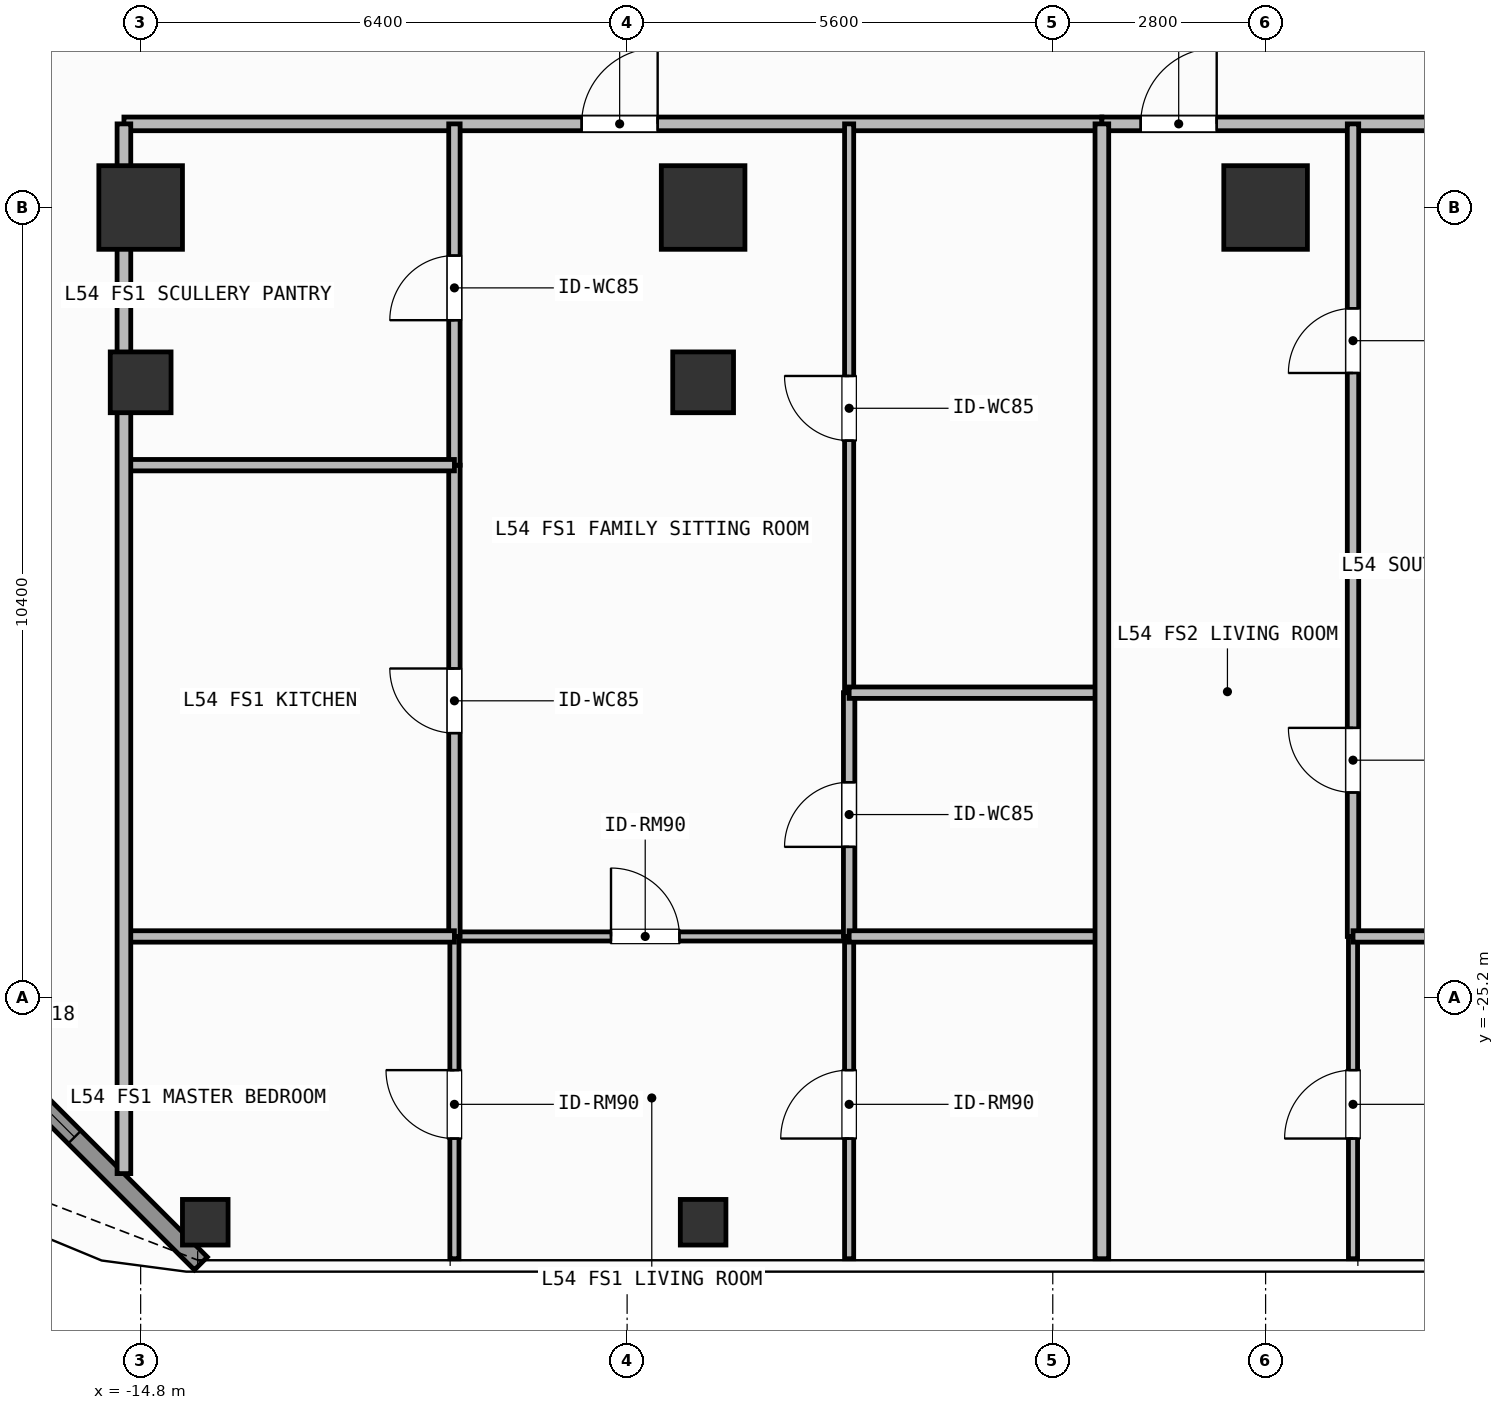
"""IFC4 building model, lengths in metres.
Left out: names, types, materials, properties, quantities, classifications, styles, units other than length and angle.
Written with IfcOpenShell. Run it as: python <this file> out.ifc"""

import sys

from ifc_helpers import new_model, si_unit, direction, frame, frame_2d, origin, origin_2d, place, context, subcontext, project, spatial, rectangle, hollow_rectangle, extrude, element, fill, save


model = new_model("IFC4")
c1 = context("Model", 3, precision=1e-05, world=origin(), true_north=direction((0.0, 1.0)))
c2 = subcontext(c1, "Body", "Model", "MODEL_VIEW")
j1 = project(units=[si_unit("LENGTHUNIT", "METRE"), si_unit("PLANEANGLEUNIT", "RADIAN")], contexts=[c1])
p1 = place(None, origin())
s1 = spatial("IfcSite", under=j1, at=p1, CompositionType="ELEMENT")
p2 = place(p1, origin())
s2 = spatial("IfcBuilding", under=s1, at=p2, CompositionType="ELEMENT")
p3 = place(p2, frame((0.0, 0.0, 219.6)))
s3 = spatial("IfcBuildingStorey", under=s2, at=p3, CompositionType="ELEMENT", Elevation=219.6)
for number, where, z_axis, x_axis in (
    (1, (-14.8, -14.8, 0.0), (0.0, 0.0, 1.0), (1.0, 0.0, 0.0)),
    (2, (-7.4, -14.8, 0.0), (0.0, 0.0, 1.0), (1.0, 0.0, 0.0)),
    (3, (0.0, -14.8, 0.0), (0.0, 0.0, 1.0), (1.0, 0.0, 0.0)),
):
    element("IfcColumn", number, at=place(p3, frame(where, z_axis=z_axis, x_axis=x_axis)), inside=s3, PredefinedType="COLUMN", context=c2, shape_type="SweptSolid", body=[
        extrude(rectangle(XDim=1.1, YDim=1.1, at=origin_2d()), origin(), (0.0, 0.0, 1.0), 3.9),
    ])
for number, where, z_axis, x_axis in (
    (4, (-14.8, -17.1, 0.0), (0.0, 0.0, 1.0), (1.0, 0.0, 0.0)),
    (5, (-7.4, -17.1, 0.0), (0.0, 0.0, 1.0), (1.0, 0.0, 0.0)),
):
    element("IfcColumn", number, at=place(p3, frame(where, z_axis=z_axis, x_axis=x_axis)), inside=s3, PredefinedType="COLUMN", context=c2, shape_type="SweptSolid", body=[
        extrude(hollow_rectangle(XDim=0.8, YDim=0.8, WallThickness=0.036, at=origin_2d()), origin(), (0.0, 0.0, 1.0), 3.9),
    ])
for number, where, z_axis, x_axis in (
    (6, (-13.95, -28.15, 0.0), (0.0, 0.0, 1.0), (1.0, 0.0, 0.0)),
    (7, (-7.4, -28.15, 0.0), (0.0, 0.0, 1.0), (1.0, 0.0, 0.0)),
):
    element("IfcColumn", number, at=place(p3, frame(where, z_axis=z_axis, x_axis=x_axis)), inside=s3, PredefinedType="COLUMN", context=c2, shape_type="SweptSolid", body=[
        extrude(hollow_rectangle(XDim=0.6, YDim=0.6, WallThickness=0.028, at=origin_2d()), origin(), (0.0, 0.0, 1.0), 3.9),
    ])
p4 = place(p3, frame((-14.008, -28.692, 0.0), z_axis=(0.0, 0.0, 1.0), x_axis=(-0.707106781187, 0.707106781187, 0.0)))
e8 = element("IfcWall", 8, at=p4, inside=s3, PredefinedType="SOLIDWALL", context=c2, shape_type="SweptSolid", body=[
    extrude(rectangle(XDim=6.201, YDim=0.24, at=frame_2d((3.101, 0.0))), origin(), (0.0, 0.0, 1.0), 3.68),
])
p5 = place(p4, frame((2.351, 0.0, 0.8)))
e9 = element("IfcOpeningElement", 9, at=p5, cuts=e8, PredefinedType="OPENING", context=c2, shape_type="SweptSolid", body=[
    extrude(rectangle(XDim=1.5, YDim=1.85, at=frame_2d((0.75, 0.925))), frame((0.0, 0.13, 0.0), z_axis=(0.0, -1.0, 0.0), x_axis=(1.0, 0.0, 0.0)), (0.0, 0.0, 1.0), 0.26),
])
p6 = place(p3, frame((-15.02, -13.7, 0.0), z_axis=(0.0, 0.0, 1.0), x_axis=(1.0, 0.0, 0.0)))
e10 = element("IfcWall", 10, at=p6, inside=s3, PredefinedType="PARTITIONING", context=c2, shape_type="SweptSolid", body=[
    extrude(rectangle(XDim=12.866, YDim=0.18, at=frame_2d((6.433, 0.0))), origin(), (0.0, 0.0, 1.0), 3.68),
])
p7 = place(p6, frame((6.022, 0.0, 0.0)))
e11 = element("IfcOpeningElement", 11, at=p7, cuts=e10, PredefinedType="OPENING", context=c2, shape_type="SweptSolid", body=[
    extrude(rectangle(XDim=1.0, YDim=2.2, at=frame_2d((0.5, 1.1))), frame((0.0, 0.1, 0.0), z_axis=(0.0, -1.0, 0.0), x_axis=(1.0, 0.0, 0.0)), (0.0, 0.0, 1.0), 0.2),
])
p8 = place(p3, frame((-10.672, -24.39, 0.0), z_axis=(0.0, 0.0, 1.0), x_axis=(1.0, 0.0, 0.0)))
e12 = element("IfcWall", 12, at=p8, inside=s3, PredefinedType="PARTITIONING", context=c2, shape_type="SweptSolid", body=[
    extrude(rectangle(XDim=5.193, YDim=0.12, at=frame_2d((2.597, 0.0))), origin(), (0.0, 0.0, 1.0), 3.68),
])
p9 = place(p8, frame((2.06, 0.0, 0.0)))
e13 = element("IfcOpeningElement", 13, at=p9, cuts=e12, PredefinedType="OPENING", context=c2, shape_type="SweptSolid", body=[
    extrude(rectangle(XDim=0.9, YDim=2.1, at=frame_2d((0.45, 1.05))), frame((0.0, 0.07, 0.0), z_axis=(0.0, -1.0, 0.0), x_axis=(1.0, 0.0, 0.0)), (0.0, 0.0, 1.0), 0.14),
])
p10 = place(p3, frame((-10.672, -24.39, 0.0), z_axis=(0.0, 0.0, 1.0), x_axis=(0.0, 1.0, 0.0)))
e14 = element("IfcWall", 14, at=p10, inside=s3, PredefinedType="PARTITIONING", context=c2, shape_type="SweptSolid", body=[
    extrude(rectangle(XDim=6.2, YDim=0.15, at=frame_2d((3.1, 0.0))), origin(), (0.0, 0.0, 1.0), 3.68),
])
p11 = place(p10, frame((2.675, 0.0, 0.0)))
e15 = element("IfcOpeningElement", 15, at=p11, cuts=e14, PredefinedType="OPENING", context=c2, shape_type="SweptSolid", body=[
    extrude(rectangle(XDim=0.85, YDim=2.1, at=frame_2d((0.425, 1.05))), frame((0.0, 0.085, 0.0), z_axis=(0.0, -1.0, 0.0), x_axis=(1.0, 0.0, 0.0)), (0.0, 0.0, 1.0), 0.17),
])
p12 = place(p3, frame((-10.672, -18.19, 0.0), z_axis=(0.0, 0.0, 1.0), x_axis=(0.0, 1.0, 0.0)))
e16 = element("IfcWall", 16, at=p12, inside=s3, PredefinedType="PARTITIONING", context=c2, shape_type="SweptSolid", body=[
    extrude(rectangle(XDim=4.49, YDim=0.15, at=frame_2d((2.245, 0.0))), origin(), (0.0, 0.0, 1.0), 3.68),
])
p13 = place(p12, frame((1.907, 0.0, 0.0)))
e17 = element("IfcOpeningElement", 17, at=p13, cuts=e16, PredefinedType="OPENING", context=c2, shape_type="SweptSolid", body=[
    extrude(rectangle(XDim=0.85, YDim=2.1, at=frame_2d((0.425, 1.05))), frame((0.0, 0.085, 0.0), z_axis=(0.0, -1.0, 0.0), x_axis=(1.0, 0.0, 0.0)), (0.0, 0.0, 1.0), 0.17),
])
p14 = place(p3, frame((-10.672, -28.63, 0.0), z_axis=(0.0, 0.0, 1.0), x_axis=(0.0, 1.0, 0.0)))
e18 = element("IfcWall", 18, at=p14, inside=s3, PredefinedType="PARTITIONING", context=c2, shape_type="SweptSolid", body=[
    extrude(rectangle(XDim=4.24, YDim=0.12, at=frame_2d((2.12, 0.0))), origin(), (0.0, 0.0, 1.0), 3.68),
])
p15 = place(p14, frame((1.581, 0.0, 0.0)))
e19 = element("IfcOpeningElement", 19, at=p15, cuts=e18, PredefinedType="OPENING", context=c2, shape_type="SweptSolid", body=[
    extrude(rectangle(XDim=0.9, YDim=2.1, at=frame_2d((0.45, 1.05))), frame((0.0, 0.07, 0.0), z_axis=(0.0, -1.0, 0.0), x_axis=(1.0, 0.0, 0.0)), (0.0, 0.0, 1.0), 0.14),
])
p16 = place(p3, frame((-5.479, -24.39, 0.0), z_axis=(0.0, 0.0, 1.0), x_axis=(0.0, 1.0, 0.0)))
e20 = element("IfcWall", 20, at=p16, inside=s3, PredefinedType="PARTITIONING", context=c2, shape_type="SweptSolid", body=[
    extrude(rectangle(XDim=3.207, YDim=0.15, at=frame_2d((1.604, 0.0))), origin(), (0.0, 0.0, 1.0), 3.68),
])
p17 = place(p16, frame((1.178, 0.0, 0.0)))
e21 = element("IfcOpeningElement", 21, at=p17, cuts=e20, PredefinedType="OPENING", context=c2, shape_type="SweptSolid", body=[
    extrude(rectangle(XDim=0.85, YDim=2.1, at=frame_2d((0.425, 1.05))), frame((0.0, 0.085, 0.0), z_axis=(0.0, -1.0, 0.0), x_axis=(1.0, 0.0, 0.0)), (0.0, 0.0, 1.0), 0.17),
])
p18 = place(p3, frame((-5.479, -21.183, 0.0), z_axis=(0.0, 0.0, 1.0), x_axis=(0.0, 1.0, 0.0)))
e22 = element("IfcWall", 22, at=p18, inside=s3, PredefinedType="PARTITIONING", context=c2, shape_type="SweptSolid", body=[
    extrude(rectangle(XDim=7.483, YDim=0.12, at=frame_2d((3.742, 0.0))), origin(), (0.0, 0.0, 1.0), 3.68),
])
p19 = place(p18, frame((3.316, 0.0, 0.0)))
e23 = element("IfcOpeningElement", 23, at=p19, cuts=e22, PredefinedType="OPENING", context=c2, shape_type="SweptSolid", body=[
    extrude(rectangle(XDim=0.85, YDim=2.1, at=frame_2d((0.425, 1.05))), frame((0.0, 0.07, 0.0), z_axis=(0.0, -1.0, 0.0), x_axis=(1.0, 0.0, 0.0)), (0.0, 0.0, 1.0), 0.14),
])
p20 = place(p3, frame((-5.479, -28.63, 0.0), z_axis=(0.0, 0.0, 1.0), x_axis=(0.0, 1.0, 0.0)))
e24 = element("IfcWall", 24, at=p20, inside=s3, PredefinedType="PARTITIONING", context=c2, shape_type="SweptSolid", body=[
    extrude(rectangle(XDim=4.24, YDim=0.12, at=frame_2d((2.12, 0.0))), origin(), (0.0, 0.0, 1.0), 3.68),
])
p21 = place(p20, frame((1.581, 0.0, 0.0)))
e25 = element("IfcOpeningElement", 25, at=p21, cuts=e24, PredefinedType="OPENING", context=c2, shape_type="SweptSolid", body=[
    extrude(rectangle(XDim=0.9, YDim=2.1, at=frame_2d((0.45, 1.05))), frame((0.0, 0.07, 0.0), z_axis=(0.0, -1.0, 0.0), x_axis=(1.0, 0.0, 0.0)), (0.0, 0.0, 1.0), 0.14),
])
p22 = place(p3, frame((-2.154, -13.7, 0.0), z_axis=(0.0, 0.0, 1.0), x_axis=(1.0, 0.0, 0.0)))
e26 = element("IfcWall", 26, at=p22, inside=s3, PredefinedType="PARTITIONING", context=c2, shape_type="SweptSolid", body=[
    extrude(rectangle(XDim=6.054, YDim=0.18, at=frame_2d((3.027, 0.0))), origin(), (0.0, 0.0, 1.0), 3.68),
])
p23 = place(p22, frame((0.511, 0.0, 0.0)))
e27 = element("IfcOpeningElement", 27, at=p23, cuts=e26, PredefinedType="OPENING", context=c2, shape_type="SweptSolid", body=[
    extrude(rectangle(XDim=1.0, YDim=2.2, at=frame_2d((0.5, 1.1))), frame((0.0, 0.1, 0.0), z_axis=(0.0, -1.0, 0.0), x_axis=(1.0, 0.0, 0.0)), (0.0, 0.0, 1.0), 0.2),
])
p24 = place(p3, frame((1.15, -19.579, 0.0), z_axis=(0.0, 0.0, 1.0), x_axis=(0.0, 1.0, 0.0)))
e28 = element("IfcWall", 28, at=p24, inside=s3, PredefinedType="PARTITIONING", context=c2, shape_type="SweptSolid", body=[
    extrude(rectangle(XDim=5.879, YDim=0.15, at=frame_2d((2.939, 0.0))), origin(), (0.0, 0.0, 1.0), 3.68),
])
p25 = place(p24, frame((2.602, 0.0, 0.0)))
e29 = element("IfcOpeningElement", 29, at=p25, cuts=e28, PredefinedType="OPENING", context=c2, shape_type="SweptSolid", body=[
    extrude(rectangle(XDim=0.85, YDim=2.1, at=frame_2d((0.425, 1.05))), frame((0.0, 0.085, 0.0), z_axis=(0.0, -1.0, 0.0), x_axis=(1.0, 0.0, 0.0)), (0.0, 0.0, 1.0), 0.17),
])
p26 = place(p3, frame((1.15, -24.39, 0.0), z_axis=(0.0, 0.0, 1.0), x_axis=(0.0, 1.0, 0.0)))
e30 = element("IfcWall", 30, at=p26, inside=s3, PredefinedType="PARTITIONING", context=c2, shape_type="SweptSolid", body=[
    extrude(rectangle(XDim=4.811, YDim=0.15, at=frame_2d((2.405, 0.0))), origin(), (0.0, 0.0, 1.0), 3.68),
])
p27 = place(p26, frame((1.894, 0.0, 0.0)))
e31 = element("IfcOpeningElement", 31, at=p27, cuts=e30, PredefinedType="OPENING", context=c2, shape_type="SweptSolid", body=[
    extrude(rectangle(XDim=0.85, YDim=2.1, at=frame_2d((0.425, 1.05))), frame((0.0, 0.085, 0.0), z_axis=(0.0, -1.0, 0.0), x_axis=(1.0, 0.0, 0.0)), (0.0, 0.0, 1.0), 0.17),
])
p28 = place(p3, frame((1.15, -28.63, 0.0), z_axis=(0.0, 0.0, 1.0), x_axis=(0.0, 1.0, 0.0)))
e32 = element("IfcWall", 32, at=p28, inside=s3, PredefinedType="PARTITIONING", context=c2, shape_type="SweptSolid", body=[
    extrude(rectangle(XDim=4.24, YDim=0.12, at=frame_2d((2.12, 0.0))), origin(), (0.0, 0.0, 1.0), 3.68),
])
p29 = place(p28, frame((1.581, 0.0, 0.0)))
e33 = element("IfcOpeningElement", 33, at=p29, cuts=e32, PredefinedType="OPENING", context=c2, shape_type="SweptSolid", body=[
    extrude(rectangle(XDim=0.9, YDim=2.1, at=frame_2d((0.45, 1.05))), frame((0.0, 0.07, 0.0), z_axis=(0.0, -1.0, 0.0), x_axis=(1.0, 0.0, 0.0)), (0.0, 0.0, 1.0), 0.14),
])
for number, where, z_axis, x_axis in (
    (34, (-15.02, -18.19, 0.0), (0.0, 0.0, 1.0), (1.0, 0.0, 0.0)),
    (35, (-15.02, -24.39, 0.0), (0.0, 0.0, 1.0), (1.0, 0.0, 0.0)),
):
    element("IfcWall", number, at=place(p3, frame(where, z_axis=z_axis, x_axis=x_axis)), inside=s3, PredefinedType="PARTITIONING", context=c2, shape_type="SweptSolid", body=[
        extrude(rectangle(XDim=4.348, YDim=0.15, at=frame_2d((2.174, 0.0))), origin(), (0.0, 0.0, 1.0), 3.68),
    ])
for number, where, z_axis, x_axis in (
    (36, (-5.479, -21.183, 0.0), (0.0, 0.0, 1.0), (1.0, 0.0, 0.0)),
    (37, (-5.479, -24.39, 0.0), (0.0, 0.0, 1.0), (1.0, 0.0, 0.0)),
):
    element("IfcWall", number, at=place(p3, frame(where, z_axis=z_axis, x_axis=x_axis)), inside=s3, PredefinedType="PARTITIONING", context=c2, shape_type="SweptSolid", body=[
        extrude(rectangle(XDim=3.325, YDim=0.15, at=frame_2d((1.663, 0.0))), origin(), (0.0, 0.0, 1.0), 3.68),
    ])
for number, where, z_axis, x_axis in (
    (38, (1.15, -19.579, 0.0), (0.0, 0.0, 1.0), (1.0, 0.0, 0.0)),
    (39, (1.15, -24.39, 0.0), (0.0, 0.0, 1.0), (1.0, 0.0, 0.0)),
):
    element("IfcWall", number, at=place(p3, frame(where, z_axis=z_axis, x_axis=x_axis)), inside=s3, PredefinedType="PARTITIONING", context=c2, shape_type="SweptSolid", body=[
        extrude(rectangle(XDim=2.75, YDim=0.15, at=frame_2d((1.375, 0.0))), origin(), (0.0, 0.0, 1.0), 3.68),
    ])
p30 = place(p3, frame((-2.154, -28.63, 0.0), z_axis=(0.0, 0.0, 1.0), x_axis=(0.0, 1.0, 0.0)))
e40 = element("IfcWall", 40, at=p30, inside=s3, PredefinedType="PARTITIONING", context=c2, shape_type="SweptSolid", body=[
    extrude(rectangle(XDim=14.93, YDim=0.18, at=frame_2d((7.465, 0.0))), origin(), (0.0, 0.0, 1.0), 3.68),
])
p31 = place(p3, frame((-15.02, -27.51, 0.0), z_axis=(0.0, 0.0, 1.0), x_axis=(0.0, 1.0, 0.0)))
e41 = element("IfcWall", 41, at=p31, inside=s3, PredefinedType="PARTITIONING", context=c2, shape_type="SweptSolid", body=[
    extrude(rectangle(XDim=13.81, YDim=0.18, at=frame_2d((6.905, 0.0))), origin(), (0.0, 0.0, 1.0), 3.68),
])
p32 = place(p5, origin())
e42 = element("IfcWindow", 42, at=p32, inside=s3, PartitioningType="SINGLE_PANEL", PredefinedType="WINDOW", context=c2, shape_type="SweptSolid", body=[
    extrude(rectangle(XDim=1.5, YDim=1.85, at=frame_2d((0.75, 0.925))), frame((0.0, 0.03, 0.0), z_axis=(0.0, -1.0, 0.0), x_axis=(1.0, 0.0, 0.0)), (0.0, 0.0, 1.0), 0.06),
])
fill(e9, e42)
p33 = place(p7, origin())
e43 = element("IfcDoor", 43, at=p33, inside=s3, OperationType="SINGLE_SWING_RIGHT", PredefinedType="DOOR", context=c2, shape_type="SweptSolid", body=[
    extrude(rectangle(XDim=1.0, YDim=2.2, at=frame_2d((0.5, 1.1))), frame((0.0, 0.025, 0.0), z_axis=(0.0, -1.0, 0.0), x_axis=(1.0, 0.0, 0.0)), (0.0, 0.0, 1.0), 0.05),
])
fill(e11, e43)
p34 = place(p9, origin())
e44 = element("IfcDoor", 44, at=p34, inside=s3, OperationType="SINGLE_SWING_LEFT", PredefinedType="DOOR", context=c2, shape_type="SweptSolid", body=[
    extrude(rectangle(XDim=0.9, YDim=2.1, at=frame_2d((0.45, 1.05))), frame((0.0, 0.025, 0.0), z_axis=(0.0, -1.0, 0.0), x_axis=(1.0, 0.0, 0.0)), (0.0, 0.0, 1.0), 0.05),
])
fill(e13, e44)
p35 = place(p11, origin())
e45 = element("IfcDoor", 45, at=p35, inside=s3, OperationType="SINGLE_SWING_RIGHT", PredefinedType="DOOR", context=c2, shape_type="SweptSolid", body=[
    extrude(rectangle(XDim=0.85, YDim=2.1, at=frame_2d((0.425, 1.05))), frame((0.0, 0.025, 0.0), z_axis=(0.0, -1.0, 0.0), x_axis=(1.0, 0.0, 0.0)), (0.0, 0.0, 1.0), 0.05),
])
fill(e15, e45)
p36 = place(p13, origin())
e46 = element("IfcDoor", 46, at=p36, inside=s3, OperationType="SINGLE_SWING_LEFT", PredefinedType="DOOR", context=c2, shape_type="SweptSolid", body=[
    extrude(rectangle(XDim=0.85, YDim=2.1, at=frame_2d((0.425, 1.05))), frame((0.0, 0.025, 0.0), z_axis=(0.0, -1.0, 0.0), x_axis=(1.0, 0.0, 0.0)), (0.0, 0.0, 1.0), 0.05),
])
fill(e17, e46)
p37 = place(p15, origin())
e47 = element("IfcDoor", 47, at=p37, inside=s3, OperationType="SINGLE_SWING_RIGHT", PredefinedType="DOOR", context=c2, shape_type="SweptSolid", body=[
    extrude(rectangle(XDim=0.9, YDim=2.1, at=frame_2d((0.45, 1.05))), frame((0.0, 0.025, 0.0), z_axis=(0.0, -1.0, 0.0), x_axis=(1.0, 0.0, 0.0)), (0.0, 0.0, 1.0), 0.05),
])
fill(e19, e47)
p38 = place(p17, origin())
e48 = element("IfcDoor", 48, at=p38, inside=s3, OperationType="SINGLE_SWING_LEFT", PredefinedType="DOOR", context=c2, shape_type="SweptSolid", body=[
    extrude(rectangle(XDim=0.85, YDim=2.1, at=frame_2d((0.425, 1.05))), frame((0.0, 0.025, 0.0), z_axis=(0.0, -1.0, 0.0), x_axis=(1.0, 0.0, 0.0)), (0.0, 0.0, 1.0), 0.05),
])
fill(e21, e48)
p39 = place(p19, origin())
e49 = element("IfcDoor", 49, at=p39, inside=s3, OperationType="SINGLE_SWING_RIGHT", PredefinedType="DOOR", context=c2, shape_type="SweptSolid", body=[
    extrude(rectangle(XDim=0.85, YDim=2.1, at=frame_2d((0.425, 1.05))), frame((0.0, 0.025, 0.0), z_axis=(0.0, -1.0, 0.0), x_axis=(1.0, 0.0, 0.0)), (0.0, 0.0, 1.0), 0.05),
])
fill(e23, e49)
p40 = place(p21, origin())
e50 = element("IfcDoor", 50, at=p40, inside=s3, OperationType="SINGLE_SWING_LEFT", PredefinedType="DOOR", context=c2, shape_type="SweptSolid", body=[
    extrude(rectangle(XDim=0.9, YDim=2.1, at=frame_2d((0.45, 1.05))), frame((0.0, 0.025, 0.0), z_axis=(0.0, -1.0, 0.0), x_axis=(1.0, 0.0, 0.0)), (0.0, 0.0, 1.0), 0.05),
])
fill(e25, e50)
p41 = place(p23, origin())
e51 = element("IfcDoor", 51, at=p41, inside=s3, OperationType="SINGLE_SWING_RIGHT", PredefinedType="DOOR", context=c2, shape_type="SweptSolid", body=[
    extrude(rectangle(XDim=1.0, YDim=2.2, at=frame_2d((0.5, 1.1))), frame((0.0, 0.025, 0.0), z_axis=(0.0, -1.0, 0.0), x_axis=(1.0, 0.0, 0.0)), (0.0, 0.0, 1.0), 0.05),
])
fill(e27, e51)
p42 = place(p25, origin())
e52 = element("IfcDoor", 52, at=p42, inside=s3, OperationType="SINGLE_SWING_LEFT", PredefinedType="DOOR", context=c2, shape_type="SweptSolid", body=[
    extrude(rectangle(XDim=0.85, YDim=2.1, at=frame_2d((0.425, 1.05))), frame((0.0, 0.025, 0.0), z_axis=(0.0, -1.0, 0.0), x_axis=(1.0, 0.0, 0.0)), (0.0, 0.0, 1.0), 0.05),
])
fill(e29, e52)
p43 = place(p27, origin())
e53 = element("IfcDoor", 53, at=p43, inside=s3, OperationType="SINGLE_SWING_RIGHT", PredefinedType="DOOR", context=c2, shape_type="SweptSolid", body=[
    extrude(rectangle(XDim=0.85, YDim=2.1, at=frame_2d((0.425, 1.05))), frame((0.0, 0.025, 0.0), z_axis=(0.0, -1.0, 0.0), x_axis=(1.0, 0.0, 0.0)), (0.0, 0.0, 1.0), 0.05),
])
fill(e31, e53)
p44 = place(p29, origin())
e54 = element("IfcDoor", 54, at=p44, inside=s3, OperationType="SINGLE_SWING_LEFT", PredefinedType="DOOR", context=c2, shape_type="SweptSolid", body=[
    extrude(rectangle(XDim=0.9, YDim=2.1, at=frame_2d((0.45, 1.05))), frame((0.0, 0.025, 0.0), z_axis=(0.0, -1.0, 0.0), x_axis=(1.0, 0.0, 0.0)), (0.0, 0.0, 1.0), 0.05),
])
fill(e33, e54)
save(model, sys.argv[1])
